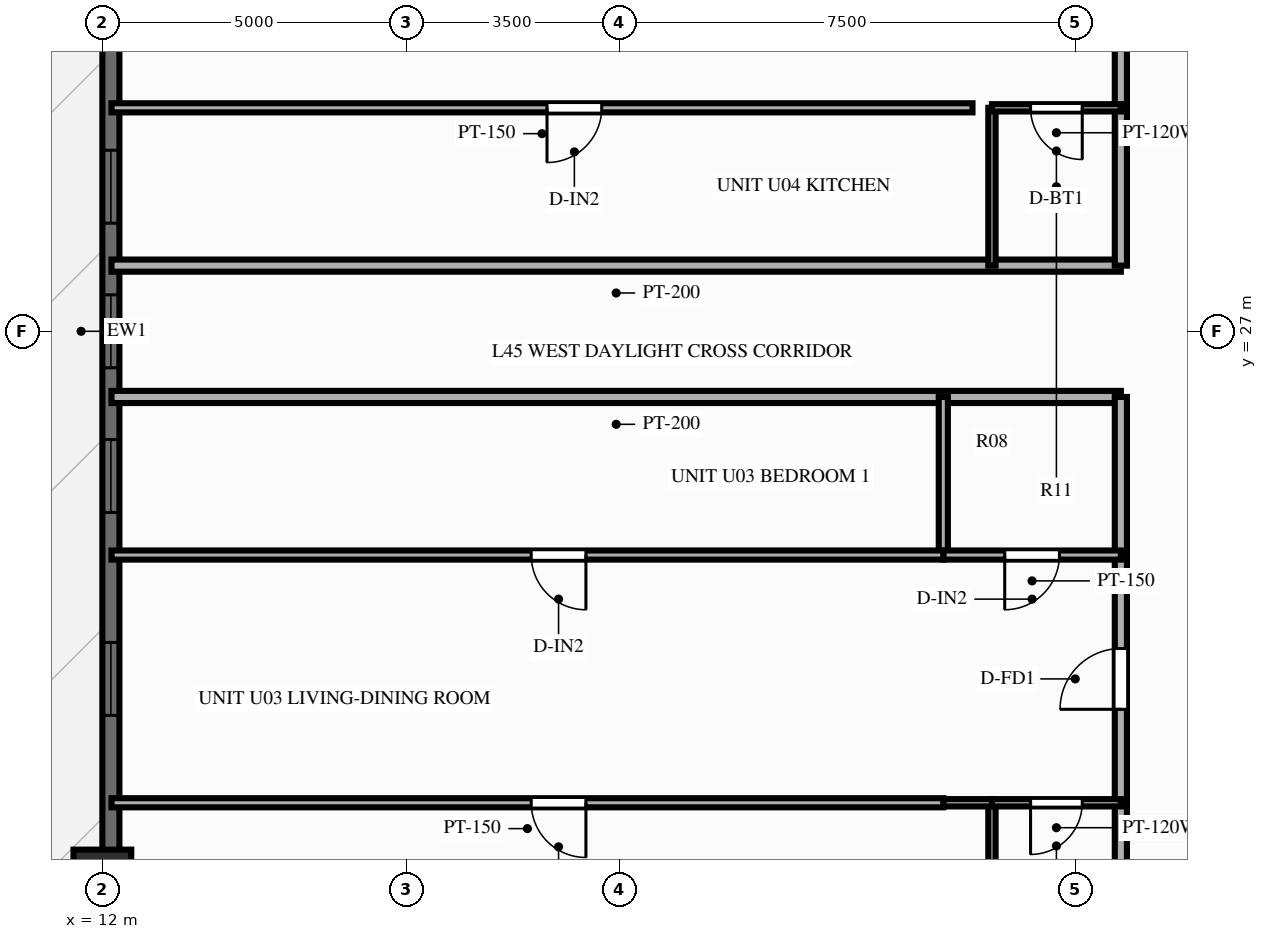
"""IFC4 building model, lengths in metres.
Left out: names, types, materials, properties, quantities, classifications, styles, units other than length and angle.
Written with IfcOpenShell. Run it as: python <this file> out.ifc"""

import sys

from ifc_helpers import new_model, si_unit, direction, frame, frame_2d, origin, origin_2d, place, context, subcontext, project, spatial, rectangle, extrude, source, transform, mapped, element, fill, save


model = new_model("IFC4")
c1 = context("Model", 3, precision=1e-05, world=origin(), true_north=direction((0.0, 1.0)))
c2 = subcontext(c1, "Body", "Model", "MODEL_VIEW")
j1 = project(units=[si_unit("LENGTHUNIT", "METRE"), si_unit("PLANEANGLEUNIT", "RADIAN")], contexts=[c1])
p1 = place(None, origin())
s1 = spatial("IfcSite", under=j1, at=p1, CompositionType="ELEMENT")
p2 = place(p1, origin())
s2 = spatial("IfcBuilding", under=s1, at=p2, CompositionType="ELEMENT")
p3 = place(p2, frame((0.0, 0.0, 141.75)))
s3 = spatial("IfcBuildingStorey", under=s2, at=p3, CompositionType="ELEMENT", Elevation=141.75)
m1 = source(origin(), c2, "Body", "SweptSolid", [
    extrude(rectangle(XDim=0.95, YDim=0.95, at=origin_2d()), origin(), (0.0, 0.0, 1.0), 3.0),
])
p4 = place(p3, frame((12.0, 18.0, 0.0), z_axis=(0.0, 0.0, 1.0), x_axis=(1.0, 0.0, 0.0)))
e1 = element("IfcColumn", 1, at=p4, inside=s3, PredefinedType="COLUMN", context=c2, shape_type="MappedRepresentation", body=[
    mapped(m1, transform((0.0, 0.0, 0.0), scale=1.0)),
])
p5 = place(p3, frame((12.14, 7.2, 0.0), z_axis=(0.0, 0.0, 1.0), x_axis=(0.0, 1.0, 0.0)))
e2 = element("IfcWall", 2, at=p5, inside=s3, PredefinedType="SOLIDWALL", context=c2, shape_type="SweptSolid", body=[
    extrude(rectangle(XDim=39.6, YDim=0.28, at=frame_2d((19.8, 0.0))), origin(), (0.0, 0.0, 1.0), 2.28),
])
p6 = place(p5, frame((0.945, 0.0, 0.25)))
e3 = element("IfcOpeningElement", 3, at=p6, cuts=e2, PredefinedType="OPENING", context=c2, shape_type="SweptSolid", body=[
    extrude(rectangle(XDim=1.2, YDim=1.5, at=frame_2d((0.6, 0.75))), frame((0.0, 0.152, 0.0), z_axis=(0.0, -1.0, 0.0), x_axis=(1.0, 0.0, 0.0)), (0.0, 0.0, 1.0), 0.304),
])
p7 = place(p5, frame((4.213, 0.0, 0.25)))
e4 = element("IfcOpeningElement", 4, at=p7, cuts=e2, PredefinedType="OPENING", context=c2, shape_type="SweptSolid", body=[
    extrude(rectangle(XDim=1.2, YDim=1.5, at=frame_2d((0.6, 0.75))), frame((0.0, 0.152, 0.0), z_axis=(0.0, -1.0, 0.0), x_axis=(1.0, 0.0, 0.0)), (0.0, 0.0, 1.0), 0.304),
])
p8 = place(p5, frame((7.55, 0.0, 0.25)))
e5 = element("IfcOpeningElement", 5, at=p8, cuts=e2, PredefinedType="OPENING", context=c2, shape_type="SweptSolid", body=[
    extrude(rectangle(XDim=1.2, YDim=1.5, at=frame_2d((0.6, 0.75))), frame((0.0, 0.152, 0.0), z_axis=(0.0, -1.0, 0.0), x_axis=(1.0, 0.0, 0.0)), (0.0, 0.0, 1.0), 0.304),
])
p9 = place(p5, frame((13.483, 0.0, 0.25)))
e6 = element("IfcOpeningElement", 6, at=p9, cuts=e2, PredefinedType="OPENING", context=c2, shape_type="SweptSolid", body=[
    extrude(rectangle(XDim=1.2, YDim=1.5, at=frame_2d((0.6, 0.75))), frame((0.0, 0.152, 0.0), z_axis=(0.0, -1.0, 0.0), x_axis=(1.0, 0.0, 0.0)), (0.0, 0.0, 1.0), 0.304),
])
p10 = place(p5, frame((16.82, 0.0, 0.25)))
e7 = element("IfcOpeningElement", 7, at=p10, cuts=e2, PredefinedType="OPENING", context=c2, shape_type="SweptSolid", body=[
    extrude(rectangle(XDim=1.2, YDim=1.5, at=frame_2d((0.6, 0.75))), frame((0.0, 0.152, 0.0), z_axis=(0.0, -1.0, 0.0), x_axis=(1.0, 0.0, 0.0)), (0.0, 0.0, 1.0), 0.304),
])
p11 = place(p5, frame((19.2, 0.0, 0.25)))
e8 = element("IfcOpeningElement", 8, at=p11, cuts=e2, PredefinedType="OPENING", context=c2, shape_type="SweptSolid", body=[
    extrude(rectangle(XDim=1.2, YDim=1.5, at=frame_2d((0.6, 0.75))), frame((0.0, 0.152, 0.0), z_axis=(0.0, -1.0, 0.0), x_axis=(1.0, 0.0, 0.0)), (0.0, 0.0, 1.0), 0.304),
])
p12 = place(p5, frame((21.578, 0.0, 0.25)))
e9 = element("IfcOpeningElement", 9, at=p12, cuts=e2, PredefinedType="OPENING", context=c2, shape_type="SweptSolid", body=[
    extrude(rectangle(XDim=1.2, YDim=1.5, at=frame_2d((0.6, 0.75))), frame((0.0, 0.152, 0.0), z_axis=(0.0, -1.0, 0.0), x_axis=(1.0, 0.0, 0.0)), (0.0, 0.0, 1.0), 0.304),
])
p13 = place(p5, frame((24.713, 0.0, 0.0)))
e10 = element("IfcOpeningElement", 10, at=p13, cuts=e2, PredefinedType="OPENING", context=c2, shape_type="SweptSolid", body=[
    extrude(rectangle(XDim=1.6, YDim=2.15, at=frame_2d((0.8, 1.075))), frame((0.0, 0.152, 0.0), z_axis=(0.0, -1.0, 0.0), x_axis=(1.0, 0.0, 0.0)), (0.0, 0.0, 1.0), 0.304),
])
p14 = place(p5, frame((29.305, 0.0, 0.25)))
e11 = element("IfcOpeningElement", 11, at=p14, cuts=e2, PredefinedType="OPENING", context=c2, shape_type="SweptSolid", body=[
    extrude(rectangle(XDim=0.7, YDim=1.5, at=frame_2d((0.35, 0.75))), frame((0.0, 0.152, 0.0), z_axis=(0.0, -1.0, 0.0), x_axis=(1.0, 0.0, 0.0)), (0.0, 0.0, 1.0), 0.304),
])
p15 = place(p5, frame((30.848, 0.0, 0.25)))
e12 = element("IfcOpeningElement", 12, at=p15, cuts=e2, PredefinedType="OPENING", context=c2, shape_type="SweptSolid", body=[
    extrude(rectangle(XDim=1.2, YDim=1.5, at=frame_2d((0.6, 0.75))), frame((0.0, 0.152, 0.0), z_axis=(0.0, -1.0, 0.0), x_axis=(1.0, 0.0, 0.0)), (0.0, 0.0, 1.0), 0.304),
])
p16 = place(p5, frame((34.183, 0.0, 0.25)))
e13 = element("IfcOpeningElement", 13, at=p16, cuts=e2, PredefinedType="OPENING", context=c2, shape_type="SweptSolid", body=[
    extrude(rectangle(XDim=1.2, YDim=1.5, at=frame_2d((0.6, 0.75))), frame((0.0, 0.152, 0.0), z_axis=(0.0, -1.0, 0.0), x_axis=(1.0, 0.0, 0.0)), (0.0, 0.0, 1.0), 0.304),
])
p17 = place(p5, frame((37.452, 0.0, 0.25)))
e14 = element("IfcOpeningElement", 14, at=p17, cuts=e2, PredefinedType="OPENING", context=c2, shape_type="SweptSolid", body=[
    extrude(rectangle(XDim=1.2, YDim=1.5, at=frame_2d((0.6, 0.75))), frame((0.0, 0.152, 0.0), z_axis=(0.0, -1.0, 0.0), x_axis=(1.0, 0.0, 0.0)), (0.0, 0.0, 1.0), 0.304),
])
p18 = place(p3, frame((28.75, 25.92, 0.0), z_axis=(0.0, 0.0, 1.0), x_axis=(-1.0, 0.0, 0.0)))
e15 = element("IfcWall", 15, at=p18, inside=s3, PredefinedType="PARTITIONING", context=c2, shape_type="SweptSolid", body=[
    extrude(rectangle(XDim=16.6, YDim=0.2, at=frame_2d((8.3, 0.0))), origin(), (0.0, 0.0, 1.0), 2.7),
])
p19 = place(p3, frame((28.75, 16.65, 0.0), z_axis=(0.0, 0.0, 1.0), x_axis=(0.0, 1.0, 0.0)))
e16 = element("IfcWall", 16, at=p19, inside=s3, PredefinedType="PARTITIONING", context=c2, shape_type="SweptSolid", body=[
    extrude(rectangle(XDim=2.596, YDim=0.2, at=frame_2d((1.298, 0.0))), origin(), (0.0, 0.0, 1.0), 2.7),
])
p20 = place(p3, frame((28.75, 19.246, 0.0), z_axis=(0.0, 0.0, 1.0), x_axis=(0.0, 1.0, 0.0)))
e17 = element("IfcWall", 17, at=p20, inside=s3, PredefinedType="PARTITIONING", context=c2, shape_type="SweptSolid", body=[
    extrude(rectangle(XDim=4.074, YDim=0.2, at=frame_2d((2.037, 0.0))), origin(), (0.0, 0.0, 1.0), 2.7),
])
p21 = place(p20, frame((1.537, 0.0, 0.0)))
e18 = element("IfcOpeningElement", 18, at=p21, cuts=e17, PredefinedType="OPENING", context=c2, shape_type="SweptSolid", body=[
    extrude(rectangle(XDim=1.0, YDim=2.15, at=frame_2d((0.5, 1.075))), frame((0.0, 0.112, 0.0), z_axis=(0.0, -1.0, 0.0), x_axis=(1.0, 0.0, 0.0)), (0.0, 0.0, 1.0), 0.224),
])
p22 = place(p3, frame((28.75, 23.32, 0.0), z_axis=(0.0, 0.0, 1.0), x_axis=(0.0, 1.0, 0.0)))
e19 = element("IfcWall", 19, at=p22, inside=s3, PredefinedType="PARTITIONING", context=c2, shape_type="SweptSolid", body=[
    extrude(rectangle(XDim=2.6, YDim=0.2, at=frame_2d((1.3, 0.0))), origin(), (0.0, 0.0, 1.0), 2.7),
])
p23 = place(p3, frame((26.63, 16.65, 0.0), z_axis=(0.0, 0.0, 1.0), x_axis=(0.0, 1.0, 0.0)))
e20 = element("IfcWall", 20, at=p23, inside=s3, PredefinedType="PARTITIONING", context=c2, shape_type="SweptSolid", body=[
    extrude(rectangle(XDim=2.596, YDim=0.12, at=frame_2d((1.298, 0.0))), origin(), (0.0, 0.0, 1.0), 2.7),
])
p24 = place(p3, frame((25.83, 23.32, 0.0), z_axis=(0.0, 0.0, 1.0), x_axis=(0.0, 1.0, 0.0)))
e21 = element("IfcWall", 21, at=p24, inside=s3, PredefinedType="PARTITIONING", context=c2, shape_type="SweptSolid", body=[
    extrude(rectangle(XDim=2.6, YDim=0.15, at=frame_2d((1.3, 0.0))), origin(), (0.0, 0.0, 1.0), 2.7),
])
p25 = place(p3, frame((28.75, 19.246, 0.0), z_axis=(0.0, 0.0, 1.0), x_axis=(-1.0, 0.0, 0.0)))
e22 = element("IfcWall", 22, at=p25, inside=s3, PredefinedType="PARTITIONING", context=c2, shape_type="SweptSolid", body=[
    extrude(rectangle(XDim=2.12, YDim=0.12, at=frame_2d((1.06, 0.0))), origin(), (0.0, 0.0, 1.0), 2.7),
])
p26 = place(p25, frame((0.635, 0.0, 0.0)))
e23 = element("IfcOpeningElement", 23, at=p26, cuts=e22, PredefinedType="OPENING", context=c2, shape_type="SweptSolid", body=[
    extrude(rectangle(XDim=0.85, YDim=2.05, at=frame_2d((0.425, 1.025))), frame((0.0, 0.072, 0.0), z_axis=(0.0, -1.0, 0.0), x_axis=(1.0, 0.0, 0.0)), (0.0, 0.0, 1.0), 0.144),
])
p27 = place(p3, frame((26.63, 19.246, 0.0), z_axis=(0.0, 0.0, 1.0), x_axis=(-1.0, 0.0, 0.0)))
e24 = element("IfcWall", 24, at=p27, inside=s3, PredefinedType="PARTITIONING", context=c2, shape_type="SweptSolid", body=[
    extrude(rectangle(XDim=0.8, YDim=0.12, at=frame_2d((0.4, 0.0))), origin(), (0.0, 0.0, 1.0), 2.7),
])
p28 = place(p3, frame((25.83, 19.246, 0.0), z_axis=(0.0, 0.0, 1.0), x_axis=(-1.0, 0.0, 0.0)))
e25 = element("IfcWall", 25, at=p28, inside=s3, PredefinedType="PARTITIONING", context=c2, shape_type="SweptSolid", body=[
    extrude(rectangle(XDim=13.68, YDim=0.15, at=frame_2d((6.84, 0.0))), origin(), (0.0, 0.0, 1.0), 2.7),
])
p29 = place(p28, frame((5.877, 0.0, 0.0)))
e26 = element("IfcOpeningElement", 26, at=p29, cuts=e25, PredefinedType="OPENING", context=c2, shape_type="SweptSolid", body=[
    extrude(rectangle(XDim=0.9, YDim=2.1, at=frame_2d((0.45, 1.05))), frame((0.0, 0.087, 0.0), z_axis=(0.0, -1.0, 0.0), x_axis=(1.0, 0.0, 0.0)), (0.0, 0.0, 1.0), 0.174),
])
p30 = place(p3, frame((28.75, 23.32, 0.0), z_axis=(0.0, 0.0, 1.0), x_axis=(-1.0, 0.0, 0.0)))
e27 = element("IfcWall", 27, at=p30, inside=s3, PredefinedType="PARTITIONING", context=c2, shape_type="SweptSolid", body=[
    extrude(rectangle(XDim=2.92, YDim=0.15, at=frame_2d((1.46, 0.0))), origin(), (0.0, 0.0, 1.0), 2.7),
])
p31 = place(p30, frame((1.01, 0.0, 0.0)))
e28 = element("IfcOpeningElement", 28, at=p31, cuts=e27, PredefinedType="OPENING", context=c2, shape_type="SweptSolid", body=[
    extrude(rectangle(XDim=0.9, YDim=2.1, at=frame_2d((0.45, 1.05))), frame((0.0, 0.087, 0.0), z_axis=(0.0, -1.0, 0.0), x_axis=(1.0, 0.0, 0.0)), (0.0, 0.0, 1.0), 0.174),
])
p32 = place(p3, frame((25.83, 23.32, 0.0), z_axis=(0.0, 0.0, 1.0), x_axis=(-1.0, 0.0, 0.0)))
e29 = element("IfcWall", 29, at=p32, inside=s3, PredefinedType="PARTITIONING", context=c2, shape_type="SweptSolid", body=[
    extrude(rectangle(XDim=13.68, YDim=0.15, at=frame_2d((6.84, 0.0))), origin(), (0.0, 0.0, 1.0), 2.7),
])
p33 = place(p32, frame((5.877, 0.0, 0.0)))
e30 = element("IfcOpeningElement", 30, at=p33, cuts=e29, PredefinedType="OPENING", context=c2, shape_type="SweptSolid", body=[
    extrude(rectangle(XDim=0.9, YDim=2.1, at=frame_2d((0.45, 1.05))), frame((0.0, 0.087, 0.0), z_axis=(0.0, -1.0, 0.0), x_axis=(1.0, 0.0, 0.0)), (0.0, 0.0, 1.0), 0.174),
])
p34 = place(p3, frame((28.75, 28.08, 0.0), z_axis=(0.0, 0.0, 1.0), x_axis=(-1.0, 0.0, 0.0)))
e31 = element("IfcWall", 31, at=p34, inside=s3, PredefinedType="PARTITIONING", context=c2, shape_type="SweptSolid", body=[
    extrude(rectangle(XDim=16.6, YDim=0.2, at=frame_2d((8.3, 0.0))), origin(), (0.0, 0.0, 1.0), 2.7),
])
p35 = place(p3, frame((28.75, 28.08, 0.0), z_axis=(0.0, 0.0, 1.0), x_axis=(0.0, 1.0, 0.0)))
e32 = element("IfcWall", 32, at=p35, inside=s3, PredefinedType="PARTITIONING", context=c2, shape_type="SweptSolid", body=[
    extrude(rectangle(XDim=2.595, YDim=0.2, at=frame_2d((1.298, 0.0))), origin(), (0.0, 0.0, 1.0), 2.7),
])
p36 = place(p3, frame((28.75, 30.676, 0.0), z_axis=(0.0, 0.0, 1.0), x_axis=(0.0, 1.0, 0.0)))
e33 = element("IfcWall", 33, at=p36, inside=s3, PredefinedType="PARTITIONING", context=c2, shape_type="SweptSolid", body=[
    extrude(rectangle(XDim=4.074, YDim=0.2, at=frame_2d((2.037, 0.0))), origin(), (0.0, 0.0, 1.0), 2.7),
])
p37 = place(p36, frame((1.537, 0.0, 0.0)))
e34 = element("IfcOpeningElement", 34, at=p37, cuts=e33, PredefinedType="OPENING", context=c2, shape_type="SweptSolid", body=[
    extrude(rectangle(XDim=1.0, YDim=2.15, at=frame_2d((0.5, 1.075))), frame((0.0, 0.112, 0.0), z_axis=(0.0, -1.0, 0.0), x_axis=(1.0, 0.0, 0.0)), (0.0, 0.0, 1.0), 0.224),
])
p38 = place(p3, frame((26.63, 28.08, 0.0), z_axis=(0.0, 0.0, 1.0), x_axis=(0.0, 1.0, 0.0)))
e35 = element("IfcWall", 35, at=p38, inside=s3, PredefinedType="PARTITIONING", context=c2, shape_type="SweptSolid", body=[
    extrude(rectangle(XDim=2.595, YDim=0.12, at=frame_2d((1.298, 0.0))), origin(), (0.0, 0.0, 1.0), 2.7),
])
p39 = place(p3, frame((28.75, 30.676, 0.0), z_axis=(0.0, 0.0, 1.0), x_axis=(-1.0, 0.0, 0.0)))
e36 = element("IfcWall", 36, at=p39, inside=s3, PredefinedType="PARTITIONING", context=c2, shape_type="SweptSolid", body=[
    extrude(rectangle(XDim=2.12, YDim=0.12, at=frame_2d((1.06, 0.0))), origin(), (0.0, 0.0, 1.0), 2.7),
])
p40 = place(p39, frame((0.635, 0.0, 0.0)))
e37 = element("IfcOpeningElement", 37, at=p40, cuts=e36, PredefinedType="OPENING", context=c2, shape_type="SweptSolid", body=[
    extrude(rectangle(XDim=0.85, YDim=2.05, at=frame_2d((0.425, 1.025))), frame((0.0, 0.072, 0.0), z_axis=(0.0, -1.0, 0.0), x_axis=(1.0, 0.0, 0.0)), (0.0, 0.0, 1.0), 0.144),
])
p41 = place(p3, frame((26.31, 30.676, 0.0), z_axis=(0.0, 0.0, 1.0), x_axis=(-1.0, 0.0, 0.0)))
e38 = element("IfcWall", 38, at=p41, inside=s3, PredefinedType="PARTITIONING", context=c2, shape_type="SweptSolid", body=[
    extrude(rectangle(XDim=14.16, YDim=0.15, at=frame_2d((7.08, 0.0))), origin(), (0.0, 0.0, 1.0), 2.7),
])
p42 = place(p41, frame((6.097, 0.0, 0.0)))
e39 = element("IfcOpeningElement", 39, at=p42, cuts=e38, PredefinedType="OPENING", context=c2, shape_type="SweptSolid", body=[
    extrude(rectangle(XDim=0.9, YDim=2.1, at=frame_2d((0.45, 1.05))), frame((0.0, 0.087, 0.0), z_axis=(0.0, -1.0, 0.0), x_axis=(1.0, 0.0, 0.0)), (0.0, 0.0, 1.0), 0.174),
])
m2 = source(origin(), c2, "Body", "SweptSolid", [
    extrude(rectangle(XDim=1.2, YDim=1.5, at=frame_2d((0.6, 0.75))), frame((0.0, 0.03, 0.0), z_axis=(0.0, -1.0, 0.0), x_axis=(1.0, 0.0, 0.0)), (0.0, 0.0, 1.0), 0.06),
])
p43 = place(p9, origin())
e40 = element("IfcWindow", 40, at=p43, inside=s3, PartitioningType="SINGLE_PANEL", PredefinedType="WINDOW", context=c2, shape_type="MappedRepresentation", body=[
    mapped(m2, transform((0.0, 0.0, 0.0), scale=1.0)),
])
fill(e6, e40)
p44 = place(p10, origin())
e41 = element("IfcWindow", 41, at=p44, inside=s3, PartitioningType="SINGLE_PANEL", PredefinedType="WINDOW", context=c2, shape_type="MappedRepresentation", body=[
    mapped(m2, transform((0.0, 0.0, 0.0), scale=1.0)),
])
fill(e7, e41)
p45 = place(p11, origin())
e42 = element("IfcWindow", 42, at=p45, inside=s3, PartitioningType="SINGLE_PANEL", PredefinedType="WINDOW", context=c2, shape_type="MappedRepresentation", body=[
    mapped(m2, transform((0.0, 0.0, 0.0), scale=1.0)),
])
fill(e8, e42)
p46 = place(p12, origin())
e43 = element("IfcWindow", 43, at=p46, inside=s3, PartitioningType="SINGLE_PANEL", PredefinedType="WINDOW", context=c2, shape_type="MappedRepresentation", body=[
    mapped(m2, transform((0.0, 0.0, 0.0), scale=1.0)),
])
fill(e9, e43)
m3 = source(origin(), c2, "Body", "SweptSolid", [
    extrude(rectangle(XDim=1.0, YDim=2.15, at=frame_2d((0.5, 1.075))), frame((0.0, 0.025, 0.0), z_axis=(0.0, -1.0, 0.0), x_axis=(1.0, 0.0, 0.0)), (0.0, 0.0, 1.0), 0.05),
])
p47 = place(p21, origin())
e44 = element("IfcDoor", 44, at=p47, inside=s3, OperationType="SINGLE_SWING_LEFT", PredefinedType="DOOR", context=c2, shape_type="MappedRepresentation", body=[
    mapped(m3, transform((0.0, 0.0, 0.0), scale=1.0)),
])
fill(e18, e44)
m4 = source(origin(), c2, "Body", "SweptSolid", [
    extrude(rectangle(XDim=0.85, YDim=2.05, at=frame_2d((0.425, 1.025))), frame((0.0, 0.025, 0.0), z_axis=(0.0, -1.0, 0.0), x_axis=(1.0, 0.0, 0.0)), (0.0, 0.0, 1.0), 0.05),
])
p48 = place(p26, origin())
e45 = element("IfcDoor", 45, at=p48, inside=s3, OperationType="SINGLE_SWING_RIGHT", PredefinedType="DOOR", context=c2, shape_type="MappedRepresentation", body=[
    mapped(m4, transform((0.0, 0.0, 0.0), scale=1.0)),
])
fill(e23, e45)
m5 = source(origin(), c2, "Body", "SweptSolid", [
    extrude(rectangle(XDim=0.9, YDim=2.1, at=frame_2d((0.45, 1.05))), frame((0.0, 0.025, 0.0), z_axis=(0.0, -1.0, 0.0), x_axis=(1.0, 0.0, 0.0)), (0.0, 0.0, 1.0), 0.05),
])
p49 = place(p29, origin())
e46 = element("IfcDoor", 46, at=p49, inside=s3, OperationType="SINGLE_SWING_LEFT", PredefinedType="DOOR", context=c2, shape_type="MappedRepresentation", body=[
    mapped(m5, transform((0.0, 0.0, 0.0), scale=1.0)),
])
fill(e26, e46)
p50 = place(p31, origin())
e47 = element("IfcDoor", 47, at=p50, inside=s3, OperationType="SINGLE_SWING_RIGHT", PredefinedType="DOOR", context=c2, shape_type="MappedRepresentation", body=[
    mapped(m5, transform((0.0, 0.0, 0.0), scale=1.0)),
])
fill(e28, e47)
p51 = place(p33, origin())
e48 = element("IfcDoor", 48, at=p51, inside=s3, OperationType="SINGLE_SWING_LEFT", PredefinedType="DOOR", context=c2, shape_type="MappedRepresentation", body=[
    mapped(m5, transform((0.0, 0.0, 0.0), scale=1.0)),
])
fill(e30, e48)
p52 = place(p40, origin())
e49 = element("IfcDoor", 49, at=p52, inside=s3, OperationType="SINGLE_SWING_LEFT", PredefinedType="DOOR", context=c2, shape_type="MappedRepresentation", body=[
    mapped(m4, transform((0.0, 0.0, 0.0), scale=1.0)),
])
fill(e37, e49)
p53 = place(p42, origin())
e50 = element("IfcDoor", 50, at=p53, inside=s3, OperationType="SINGLE_SWING_RIGHT", PredefinedType="DOOR", context=c2, shape_type="MappedRepresentation", body=[
    mapped(m5, transform((0.0, 0.0, 0.0), scale=1.0)),
])
fill(e39, e50)
save(model, sys.argv[1])
